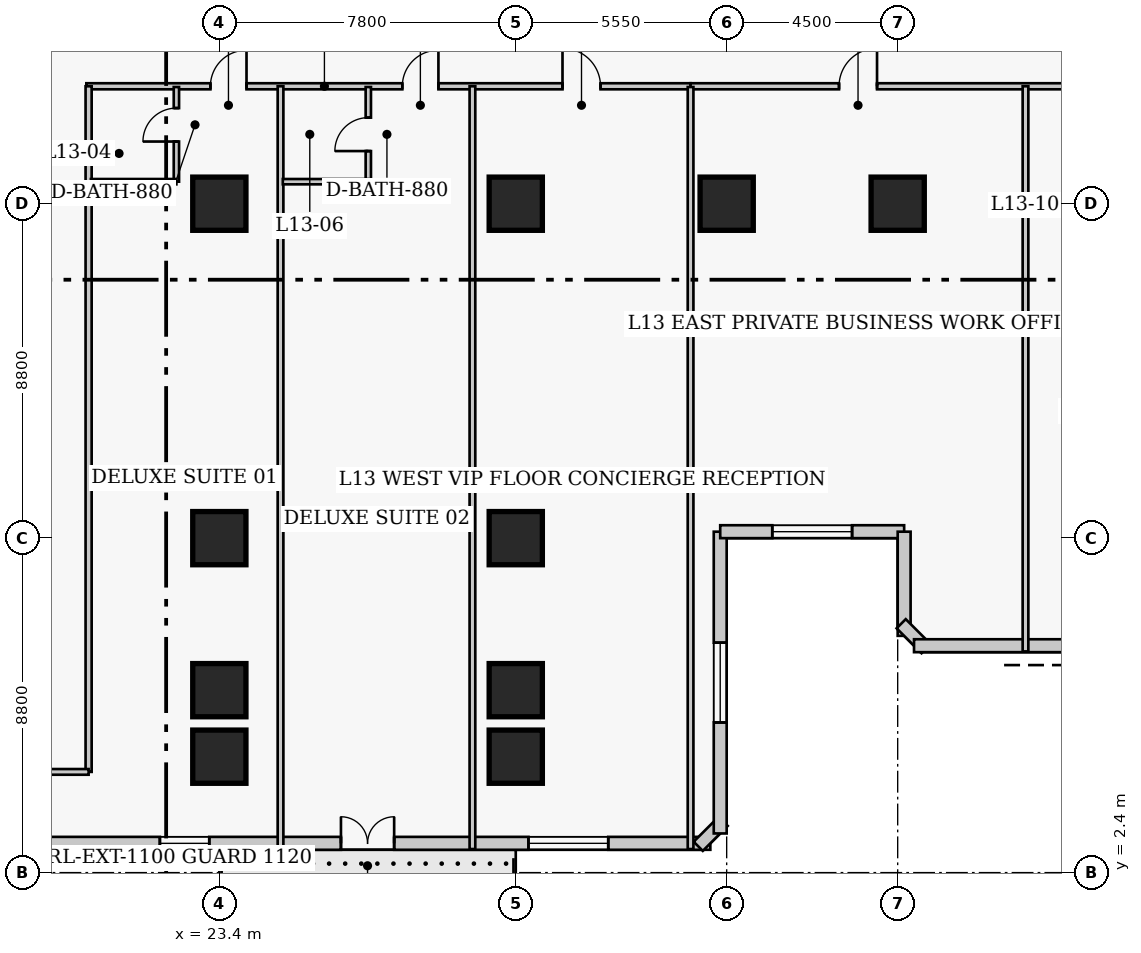
"""IFC4 building model, lengths in metres.
Left out: names, types, materials, properties, quantities, classifications, styles, units other than length and angle.
Written with IfcOpenShell. Run it as: python <this file> out.ifc"""

import sys

from ifc_helpers import new_model, si_unit, direction, frame, frame_2d, origin, origin_2d, place, context, subcontext, project, spatial, rectangle, extrude, element, fill, save


model = new_model("IFC4")
c1 = context("Model", 3, precision=1e-05, world=origin(), true_north=direction((0.0, 1.0)))
c2 = subcontext(c1, "Body", "Model", "MODEL_VIEW")
j1 = project(units=[si_unit("LENGTHUNIT", "METRE"), si_unit("PLANEANGLEUNIT", "RADIAN")], contexts=[c1])
p1 = place(None, origin())
s1 = spatial("IfcSite", under=j1, at=p1, CompositionType="ELEMENT")
p2 = place(p1, origin())
s2 = spatial("IfcBuilding", under=s1, at=p2, CompositionType="ELEMENT")
p3 = place(p2, frame((0.0, 0.0, 56.4)))
s3 = spatial("IfcBuildingStorey", under=s2, at=p3, CompositionType="ELEMENT", Elevation=56.4)
for number, where, z_axis, x_axis in (
    (1, (23.4, 11.2, 0.0), (0.0, 0.0, 1.0), (1.0, 0.0, 0.0)),
    (2, (23.4, 20.0, 0.0), (0.0, 0.0, 1.0), (1.0, 0.0, 0.0)),
    (3, (31.2, 11.2, 0.0), (0.0, 0.0, 1.0), (1.0, 0.0, 0.0)),
    (4, (31.2, 20.0, 0.0), (0.0, 0.0, 1.0), (1.0, 0.0, 0.0)),
    (5, (36.75, 20.0, 0.0), (0.0, 0.0, 1.0), (1.0, 0.0, 0.0)),
    (6, (41.25, 20.0, 0.0), (0.0, 0.0, 1.0), (1.0, 0.0, 0.0)),
    (7, (23.4, 7.2, 0.0), (0.0, 0.0, 1.0), (1.0, 0.0, 0.0)),
    (8, (31.2, 7.2, 0.0), (0.0, 0.0, 1.0), (1.0, 0.0, 0.0)),
    (9, (23.4, 5.45, 0.0), (0.0, 0.0, 1.0), (1.0, 0.0, 0.0)),
    (10, (31.2, 5.45, 0.0), (0.0, 0.0, 1.0), (1.0, 0.0, 0.0)),
):
    element("IfcColumn", number, at=place(p3, frame(where, z_axis=z_axis, x_axis=x_axis)), inside=s3, PredefinedType="COLUMN", context=c2, shape_type="SweptSolid", body=[
        extrude(rectangle(XDim=1.4, YDim=1.4, at=origin_2d()), origin(), (0.0, 0.0, 1.0), 3.8),
    ])
p4 = place(p3, frame((6.43, 3.17, 0.0), z_axis=(0.0, 0.0, 1.0), x_axis=(1.0, 0.0, 0.0)))
e11 = element("IfcWall", 11, at=p4, inside=s3, PredefinedType="SOLIDWALL", context=c2, shape_type="SweptSolid", body=[
    extrude(rectangle(XDim=29.89, YDim=0.34, at=frame_2d((14.945, 0.0))), origin(), (0.0, 0.0, 1.0), 3.54),
])
p5 = place(p4, frame((20.17, 0.0, 0.0)))
e12 = element("IfcOpeningElement", 12, at=p5, cuts=e11, PredefinedType="OPENING", context=c2, shape_type="SweptSolid", body=[
    extrude(rectangle(XDim=1.4, YDim=2.15, at=frame_2d((0.7, 1.075))), frame((0.0, 0.18, 0.0), z_axis=(0.0, -1.0, 0.0), x_axis=(1.0, 0.0, 0.0)), (0.0, 0.0, 1.0), 0.36),
])
p6 = place(p4, frame((2.686, 0.0, 0.85)))
e13 = element("IfcOpeningElement", 13, at=p6, cuts=e11, PredefinedType="OPENING", context=c2, shape_type="SweptSolid", body=[
    extrude(rectangle(XDim=2.1, YDim=1.85, at=frame_2d((1.05, 0.925))), frame((0.0, 0.18, 0.0), z_axis=(0.0, -1.0, 0.0), x_axis=(1.0, 0.0, 0.0)), (0.0, 0.0, 1.0), 0.36),
])
p7 = place(p4, frame((25.104, 0.0, 0.85)))
e14 = element("IfcOpeningElement", 14, at=p7, cuts=e11, PredefinedType="OPENING", context=c2, shape_type="SweptSolid", body=[
    extrude(rectangle(XDim=2.1, YDim=1.85, at=frame_2d((1.05, 0.925))), frame((0.0, 0.18, 0.0), z_axis=(0.0, -1.0, 0.0), x_axis=(1.0, 0.0, 0.0)), (0.0, 0.0, 1.0), 0.36),
])
p8 = place(p4, frame((15.405, 0.0, 0.85)))
e15 = element("IfcOpeningElement", 15, at=p8, cuts=e11, PredefinedType="OPENING", context=c2, shape_type="SweptSolid", body=[
    extrude(rectangle(XDim=1.3, YDim=1.7, at=frame_2d((0.65, 0.85))), frame((0.0, 0.18, 0.0), z_axis=(0.0, -1.0, 0.0), x_axis=(1.0, 0.0, 0.0)), (0.0, 0.0, 1.0), 0.36),
])
p9 = place(p3, frame((36.001, 3.092, 0.0), z_axis=(0.0, 0.0, 1.0), x_axis=(0.707106781187, 0.707106781187, 0.0)))
e16 = element("IfcWall", 16, at=p9, inside=s3, PredefinedType="SOLIDWALL", context=c2, shape_type="SweptSolid", body=[
    extrude(rectangle(XDim=0.929, YDim=0.34, at=frame_2d((0.464, 0.0))), origin(), (0.0, 0.0, 1.0), 3.54),
])
p10 = place(p3, frame((36.58, 3.43, 0.0), z_axis=(0.0, 0.0, 1.0), x_axis=(0.0, 1.0, 0.0)))
e17 = element("IfcWall", 17, at=p10, inside=s3, PredefinedType="SOLIDWALL", context=c2, shape_type="SweptSolid", body=[
    extrude(rectangle(XDim=7.94, YDim=0.34, at=frame_2d((3.97, 0.0))), origin(), (0.0, 0.0, 1.0), 3.54),
])
p11 = place(p10, frame((2.92, 0.0, 0.85)))
e18 = element("IfcOpeningElement", 18, at=p11, cuts=e17, PredefinedType="OPENING", context=c2, shape_type="SweptSolid", body=[
    extrude(rectangle(XDim=2.1, YDim=1.85, at=frame_2d((1.05, 0.925))), frame((0.0, 0.18, 0.0), z_axis=(0.0, -1.0, 0.0), x_axis=(1.0, 0.0, 0.0)), (0.0, 0.0, 1.0), 0.36),
])
p12 = place(p3, frame((36.58, 11.37, 0.0), z_axis=(0.0, 0.0, 1.0), x_axis=(1.0, 0.0, 0.0)))
e19 = element("IfcWall", 19, at=p12, inside=s3, PredefinedType="SOLIDWALL", context=c2, shape_type="SweptSolid", body=[
    extrude(rectangle(XDim=4.84, YDim=0.34, at=frame_2d((2.42, 0.0))), origin(), (0.0, 0.0, 1.0), 3.54),
])
p13 = place(p12, frame((1.37, 0.0, 0.85)))
e20 = element("IfcOpeningElement", 20, at=p13, cuts=e19, PredefinedType="OPENING", context=c2, shape_type="SweptSolid", body=[
    extrude(rectangle(XDim=2.1, YDim=1.85, at=frame_2d((1.05, 0.925))), frame((0.0, 0.18, 0.0), z_axis=(0.0, -1.0, 0.0), x_axis=(1.0, 0.0, 0.0)), (0.0, 0.0, 1.0), 0.36),
])
p14 = place(p3, frame((41.42, 11.37, 0.0), z_axis=(0.0, 0.0, 1.0), x_axis=(0.0, -1.0, 0.0)))
e21 = element("IfcWall", 21, at=p14, inside=s3, PredefinedType="SOLIDWALL", context=c2, shape_type="SweptSolid", body=[
    extrude(rectangle(XDim=2.74, YDim=0.34, at=frame_2d((1.37, 0.0))), origin(), (0.0, 0.0, 1.0), 3.54),
])
p15 = place(p3, frame((41.342, 8.948, 0.0), z_axis=(0.0, 0.0, 1.0), x_axis=(0.707238225886, -0.706975312048, 0.0)))
e22 = element("IfcWall", 22, at=p15, inside=s3, PredefinedType="SOLIDWALL", context=c2, shape_type="SweptSolid", body=[
    extrude(rectangle(XDim=0.929, YDim=0.34, at=frame_2d((0.464, 0.0))), origin(), (0.0, 0.0, 1.0), 3.54),
])
p16 = place(p3, frame((41.68, 8.37, 0.0), z_axis=(0.0, 0.0, 1.0), x_axis=(1.0, 0.0, 0.0)))
e23 = element("IfcWall", 23, at=p16, inside=s3, PredefinedType="SOLIDWALL", context=c2, shape_type="SweptSolid", body=[
    extrude(rectangle(XDim=29.89, YDim=0.34, at=frame_2d((14.945, 0.0))), origin(), (0.0, 0.0, 1.0), 3.54),
])
p17 = place(p16, frame((16.981, 0.0, 0.85)))
e24 = element("IfcOpeningElement", 24, at=p17, cuts=e23, PredefinedType="OPENING", context=c2, shape_type="SweptSolid", body=[
    extrude(rectangle(XDim=2.1, YDim=1.85, at=frame_2d((1.05, 0.925))), frame((0.0, 0.18, 0.0), z_axis=(0.0, -1.0, 0.0), x_axis=(1.0, 0.0, 0.0)), (0.0, 0.0, 1.0), 0.36),
])
p18 = place(p16, frame((26.254, 0.0, 0.85)))
e25 = element("IfcOpeningElement", 25, at=p18, cuts=e23, PredefinedType="OPENING", context=c2, shape_type="SweptSolid", body=[
    extrude(rectangle(XDim=2.1, YDim=1.85, at=frame_2d((1.05, 0.925))), frame((0.0, 0.18, 0.0), z_axis=(0.0, -1.0, 0.0), x_axis=(1.0, 0.0, 0.0)), (0.0, 0.0, 1.0), 0.36),
])
p19 = place(p16, frame((6.15, 0.0, 0.85)))
e26 = element("IfcOpeningElement", 26, at=p19, cuts=e23, PredefinedType="OPENING", context=c2, shape_type="SweptSolid", body=[
    extrude(rectangle(XDim=1.3, YDim=1.7, at=frame_2d((0.65, 0.85))), frame((0.0, 0.18, 0.0), z_axis=(0.0, -1.0, 0.0), x_axis=(1.0, 0.0, 0.0)), (0.0, 0.0, 1.0), 0.36),
])
p20 = place(p16, frame((13.763, 0.0, 0.85)))
e27 = element("IfcOpeningElement", 27, at=p20, cuts=e23, PredefinedType="OPENING", context=c2, shape_type="SweptSolid", body=[
    extrude(rectangle(XDim=1.3, YDim=1.7, at=frame_2d((0.65, 0.85))), frame((0.0, 0.18, 0.0), z_axis=(0.0, -1.0, 0.0), x_axis=(1.0, 0.0, 0.0)), (0.0, 0.0, 1.0), 0.36),
])
p21 = place(p3, frame((19.9, 23.09, 0.0), z_axis=(0.0, 0.0, 1.0), x_axis=(1.0, 0.0, 0.0)))
e28 = element("IfcWall", 28, at=p21, inside=s3, PredefinedType="PARTITIONING", context=c2, shape_type="SweptSolid", body=[
    extrude(rectangle(XDim=15.9, YDim=0.16, at=frame_2d((7.95, 0.0))), origin(), (0.0, 0.0, 1.0), 3.54),
])
p22 = place(p21, frame((3.265, 0.0, 0.0)))
e29 = element("IfcOpeningElement", 29, at=p22, cuts=e28, PredefinedType="OPENING", context=c2, shape_type="SweptSolid", body=[
    extrude(rectangle(XDim=0.95, YDim=2.1, at=frame_2d((0.475, 1.05))), frame((0.0, 0.09, 0.0), z_axis=(0.0, -1.0, 0.0), x_axis=(1.0, 0.0, 0.0)), (0.0, 0.0, 1.0), 0.18),
])
p23 = place(p21, frame((8.315, 0.0, 0.0)))
e30 = element("IfcOpeningElement", 30, at=p23, cuts=e28, PredefinedType="OPENING", context=c2, shape_type="SweptSolid", body=[
    extrude(rectangle(XDim=0.95, YDim=2.1, at=frame_2d((0.475, 1.05))), frame((0.0, 0.09, 0.0), z_axis=(0.0, -1.0, 0.0), x_axis=(1.0, 0.0, 0.0)), (0.0, 0.0, 1.0), 0.18),
])
p24 = place(p21, frame((12.53, 0.0, 0.0)))
e31 = element("IfcOpeningElement", 31, at=p24, cuts=e28, PredefinedType="OPENING", context=c2, shape_type="SweptSolid", body=[
    extrude(rectangle(XDim=1.0, YDim=2.15, at=frame_2d((0.5, 1.075))), frame((0.0, 0.09, 0.0), z_axis=(0.0, -1.0, 0.0), x_axis=(1.0, 0.0, 0.0)), (0.0, 0.0, 1.0), 0.18),
])
p25 = place(p3, frame((35.8, 23.09, 0.0), z_axis=(0.0, 0.0, 1.0), x_axis=(1.0, 0.0, 0.0)))
e32 = element("IfcWall", 32, at=p25, inside=s3, PredefinedType="PARTITIONING", context=c2, shape_type="SweptSolid", body=[
    extrude(rectangle(XDim=23.2, YDim=0.16, at=frame_2d((11.6, 0.0))), origin(), (0.0, 0.0, 1.0), 3.54),
])
p26 = place(p25, frame((3.907, 0.0, 0.0)))
e33 = element("IfcOpeningElement", 33, at=p26, cuts=e32, PredefinedType="OPENING", context=c2, shape_type="SweptSolid", body=[
    extrude(rectangle(XDim=1.0, YDim=2.15, at=frame_2d((0.5, 1.075))), frame((0.0, 0.09, 0.0), z_axis=(0.0, -1.0, 0.0), x_axis=(1.0, 0.0, 0.0)), (0.0, 0.0, 1.0), 0.18),
])
p27 = place(p25, frame((11.04, 0.0, 0.0)))
e34 = element("IfcOpeningElement", 34, at=p27, cuts=e32, PredefinedType="OPENING", context=c2, shape_type="SweptSolid", body=[
    extrude(rectangle(XDim=0.95, YDim=2.1, at=frame_2d((0.475, 1.05))), frame((0.0, 0.09, 0.0), z_axis=(0.0, -1.0, 0.0), x_axis=(1.0, 0.0, 0.0)), (0.0, 0.0, 1.0), 0.18),
])
p28 = place(p25, frame((18.203, 0.0, 0.0)))
e35 = element("IfcOpeningElement", 35, at=p28, cuts=e32, PredefinedType="OPENING", context=c2, shape_type="SweptSolid", body=[
    extrude(rectangle(XDim=0.95, YDim=2.1, at=frame_2d((0.475, 1.05))), frame((0.0, 0.09, 0.0), z_axis=(0.0, -1.0, 0.0), x_axis=(1.0, 0.0, 0.0)), (0.0, 0.0, 1.0), 0.18),
])
p29 = place(p3, frame((19.96, 5.05, 0.0), z_axis=(0.0, 0.0, 1.0), x_axis=(0.0, 1.0, 0.0)))
e36 = element("IfcWall", 36, at=p29, inside=s3, PredefinedType="PARTITIONING", context=c2, shape_type="SweptSolid", body=[
    extrude(rectangle(XDim=18.04, YDim=0.16, at=frame_2d((9.02, 0.0))), origin(), (0.0, 0.0, 1.0), 3.54),
])
p30 = place(p3, frame((17.74, 5.05, 0.0), z_axis=(0.0, 0.0, 1.0), x_axis=(1.0, 0.0, 0.0)))
e37 = element("IfcWall", 37, at=p30, inside=s3, PredefinedType="PARTITIONING", context=c2, shape_type="SweptSolid", body=[
    extrude(rectangle(XDim=2.22, YDim=0.15, at=frame_2d((1.11, 0.0))), origin(), (0.0, 0.0, 1.0), 3.54),
])
p31 = place(p3, frame((22.27, 20.58, 0.0), z_axis=(0.0, 0.0, 1.0), x_axis=(0.0, 1.0, 0.0)))
e38 = element("IfcWall", 38, at=p31, inside=s3, PredefinedType="PLUMBINGWALL", context=c2, shape_type="SweptSolid", body=[
    extrude(rectangle(XDim=2.49, YDim=0.14, at=frame_2d((1.245, 0.0))), origin(), (0.0, 0.0, 1.0), 3.54),
])
p32 = place(p31, frame((1.056, 0.0, 0.0)))
e39 = element("IfcOpeningElement", 39, at=p32, cuts=e38, PredefinedType="OPENING", context=c2, shape_type="SweptSolid", body=[
    extrude(rectangle(XDim=0.88, YDim=2.05, at=frame_2d((0.44, 1.025))), frame((0.0, 0.08, 0.0), z_axis=(0.0, -1.0, 0.0), x_axis=(1.0, 0.0, 0.0)), (0.0, 0.0, 1.0), 0.16),
])
p33 = place(p3, frame((20.02, 20.58, 0.0), z_axis=(0.0, 0.0, 1.0), x_axis=(1.0, 0.0, 0.0)))
e40 = element("IfcWall", 40, at=p33, inside=s3, PredefinedType="PLUMBINGWALL", context=c2, shape_type="SweptSolid", body=[
    extrude(rectangle(XDim=2.25, YDim=0.14, at=frame_2d((1.125, 0.0))), origin(), (0.0, 0.0, 1.0), 3.54),
])
p34 = place(p3, frame((25.01, 3.02, 0.0), z_axis=(0.0, 0.0, 1.0), x_axis=(0.0, 1.0, 0.0)))
e41 = element("IfcWall", 41, at=p34, inside=s3, PredefinedType="PARTITIONING", context=c2, shape_type="SweptSolid", body=[
    extrude(rectangle(XDim=20.07, YDim=0.15, at=frame_2d((10.035, 0.0))), origin(), (0.0, 0.0, 1.0), 3.54),
])
p35 = place(p3, frame((27.32, 20.58, 0.0), z_axis=(0.0, 0.0, 1.0), x_axis=(0.0, 1.0, 0.0)))
e42 = element("IfcWall", 42, at=p35, inside=s3, PredefinedType="PLUMBINGWALL", context=c2, shape_type="SweptSolid", body=[
    extrude(rectangle(XDim=2.49, YDim=0.14, at=frame_2d((1.245, 0.0))), origin(), (0.0, 0.0, 1.0), 3.54),
])
p36 = place(p35, frame((0.805, 0.0, 0.0)))
e43 = element("IfcOpeningElement", 43, at=p36, cuts=e42, PredefinedType="OPENING", context=c2, shape_type="SweptSolid", body=[
    extrude(rectangle(XDim=0.88, YDim=2.05, at=frame_2d((0.44, 1.025))), frame((0.0, 0.08, 0.0), z_axis=(0.0, -1.0, 0.0), x_axis=(1.0, 0.0, 0.0)), (0.0, 0.0, 1.0), 0.16),
])
p37 = place(p3, frame((25.07, 20.58, 0.0), z_axis=(0.0, 0.0, 1.0), x_axis=(1.0, 0.0, 0.0)))
e44 = element("IfcWall", 44, at=p37, inside=s3, PredefinedType="PLUMBINGWALL", context=c2, shape_type="SweptSolid", body=[
    extrude(rectangle(XDim=2.25, YDim=0.14, at=frame_2d((1.125, 0.0))), origin(), (0.0, 0.0, 1.0), 3.54),
])
p38 = place(p3, frame((30.06, 3.02, 0.0), z_axis=(0.0, 0.0, 1.0), x_axis=(0.0, 1.0, 0.0)))
e45 = element("IfcWall", 45, at=p38, inside=s3, PredefinedType="PARTITIONING", context=c2, shape_type="SweptSolid", body=[
    extrude(rectangle(XDim=20.07, YDim=0.15, at=frame_2d((10.035, 0.0))), origin(), (0.0, 0.0, 1.0), 3.54),
])
p39 = place(p3, frame((35.8, 3.02, 0.0), z_axis=(0.0, 0.0, 1.0), x_axis=(0.0, 1.0, 0.0)))
e46 = element("IfcWall", 46, at=p39, inside=s3, PredefinedType="PARTITIONING", context=c2, shape_type="SweptSolid", body=[
    extrude(rectangle(XDim=20.05, YDim=0.15, at=frame_2d((10.025, 0.0))), origin(), (0.0, 0.0, 1.0), 3.54),
])
p40 = place(p3, frame((44.613, 8.22, 0.0), z_axis=(0.0, 0.0, 1.0), x_axis=(0.0, 1.0, 0.0)))
e47 = element("IfcWall", 47, at=p40, inside=s3, PredefinedType="PARTITIONING", context=c2, shape_type="SweptSolid", body=[
    extrude(rectangle(XDim=14.87, YDim=0.15, at=frame_2d((7.435, 0.0))), origin(), (0.0, 0.0, 1.0), 3.54),
])
p41 = place(p5, origin())
e48 = element("IfcDoor", 48, at=p41, inside=s3, OperationType="DOUBLE_DOOR_SINGLE_SWING", PredefinedType="DOOR", context=c2, shape_type="SweptSolid", body=[
    extrude(rectangle(XDim=1.4, YDim=2.15, at=frame_2d((0.7, 1.075))), frame((0.0, 0.025, 0.0), z_axis=(0.0, -1.0, 0.0), x_axis=(1.0, 0.0, 0.0)), (0.0, 0.0, 1.0), 0.05),
])
fill(e12, e48)
p42 = place(p7, origin())
e49 = element("IfcWindow", 49, at=p42, inside=s3, PartitioningType="SINGLE_PANEL", PredefinedType="WINDOW", context=c2, shape_type="SweptSolid", body=[
    extrude(rectangle(XDim=2.1, YDim=1.85, at=frame_2d((1.05, 0.925))), frame((0.0, 0.03, 0.0), z_axis=(0.0, -1.0, 0.0), x_axis=(1.0, 0.0, 0.0)), (0.0, 0.0, 1.0), 0.06),
])
fill(e14, e49)
p43 = place(p11, origin())
e50 = element("IfcWindow", 50, at=p43, inside=s3, PartitioningType="SINGLE_PANEL", PredefinedType="WINDOW", context=c2, shape_type="SweptSolid", body=[
    extrude(rectangle(XDim=2.1, YDim=1.85, at=frame_2d((1.05, 0.925))), frame((0.0, 0.03, 0.0), z_axis=(0.0, -1.0, 0.0), x_axis=(1.0, 0.0, 0.0)), (0.0, 0.0, 1.0), 0.06),
])
fill(e18, e50)
p44 = place(p13, origin())
e51 = element("IfcWindow", 51, at=p44, inside=s3, PartitioningType="SINGLE_PANEL", PredefinedType="WINDOW", context=c2, shape_type="SweptSolid", body=[
    extrude(rectangle(XDim=2.1, YDim=1.85, at=frame_2d((1.05, 0.925))), frame((0.0, 0.03, 0.0), z_axis=(0.0, -1.0, 0.0), x_axis=(1.0, 0.0, 0.0)), (0.0, 0.0, 1.0), 0.06),
])
fill(e20, e51)
p45 = place(p8, origin())
e52 = element("IfcWindow", 52, at=p45, inside=s3, PartitioningType="SINGLE_PANEL", PredefinedType="WINDOW", context=c2, shape_type="SweptSolid", body=[
    extrude(rectangle(XDim=1.3, YDim=1.7, at=frame_2d((0.65, 0.85))), frame((0.0, 0.03, 0.0), z_axis=(0.0, -1.0, 0.0), x_axis=(1.0, 0.0, 0.0)), (0.0, 0.0, 1.0), 0.06),
])
fill(e15, e52)
p46 = place(p32, origin())
e53 = element("IfcDoor", 53, at=p46, inside=s3, OperationType="SINGLE_SWING_LEFT", PredefinedType="DOOR", context=c2, shape_type="SweptSolid", body=[
    extrude(rectangle(XDim=0.88, YDim=2.05, at=frame_2d((0.44, 1.025))), frame((0.0, 0.025, 0.0), z_axis=(0.0, -1.0, 0.0), x_axis=(1.0, 0.0, 0.0)), (0.0, 0.0, 1.0), 0.05),
])
fill(e39, e53)
p47 = place(p22, origin())
e54 = element("IfcDoor", 54, at=p47, inside=s3, OperationType="SINGLE_SWING_RIGHT", PredefinedType="DOOR", context=c2, shape_type="SweptSolid", body=[
    extrude(rectangle(XDim=0.95, YDim=2.1, at=frame_2d((0.475, 1.05))), frame((0.0, 0.025, 0.0), z_axis=(0.0, -1.0, 0.0), x_axis=(1.0, 0.0, 0.0)), (0.0, 0.0, 1.0), 0.05),
])
fill(e29, e54)
p48 = place(p36, origin())
e55 = element("IfcDoor", 55, at=p48, inside=s3, OperationType="SINGLE_SWING_LEFT", PredefinedType="DOOR", context=c2, shape_type="SweptSolid", body=[
    extrude(rectangle(XDim=0.88, YDim=2.05, at=frame_2d((0.44, 1.025))), frame((0.0, 0.025, 0.0), z_axis=(0.0, -1.0, 0.0), x_axis=(1.0, 0.0, 0.0)), (0.0, 0.0, 1.0), 0.05),
])
fill(e43, e55)
p49 = place(p23, origin())
e56 = element("IfcDoor", 56, at=p49, inside=s3, OperationType="SINGLE_SWING_RIGHT", PredefinedType="DOOR", context=c2, shape_type="SweptSolid", body=[
    extrude(rectangle(XDim=0.95, YDim=2.1, at=frame_2d((0.475, 1.05))), frame((0.0, 0.025, 0.0), z_axis=(0.0, -1.0, 0.0), x_axis=(1.0, 0.0, 0.0)), (0.0, 0.0, 1.0), 0.05),
])
fill(e30, e56)
p50 = place(p24, origin())
e57 = element("IfcDoor", 57, at=p50, inside=s3, OperationType="SINGLE_SWING_LEFT", PredefinedType="DOOR", context=c2, shape_type="SweptSolid", body=[
    extrude(rectangle(XDim=1.0, YDim=2.15, at=frame_2d((0.5, 1.075))), frame((0.0, 0.025, 0.0), z_axis=(0.0, -1.0, 0.0), x_axis=(1.0, 0.0, 0.0)), (0.0, 0.0, 1.0), 0.05),
])
fill(e31, e57)
p51 = place(p26, origin())
e58 = element("IfcDoor", 58, at=p51, inside=s3, OperationType="SINGLE_SWING_RIGHT", PredefinedType="DOOR", context=c2, shape_type="SweptSolid", body=[
    extrude(rectangle(XDim=1.0, YDim=2.15, at=frame_2d((0.5, 1.075))), frame((0.0, 0.025, 0.0), z_axis=(0.0, -1.0, 0.0), x_axis=(1.0, 0.0, 0.0)), (0.0, 0.0, 1.0), 0.05),
])
fill(e33, e58)
save(model, sys.argv[1])
